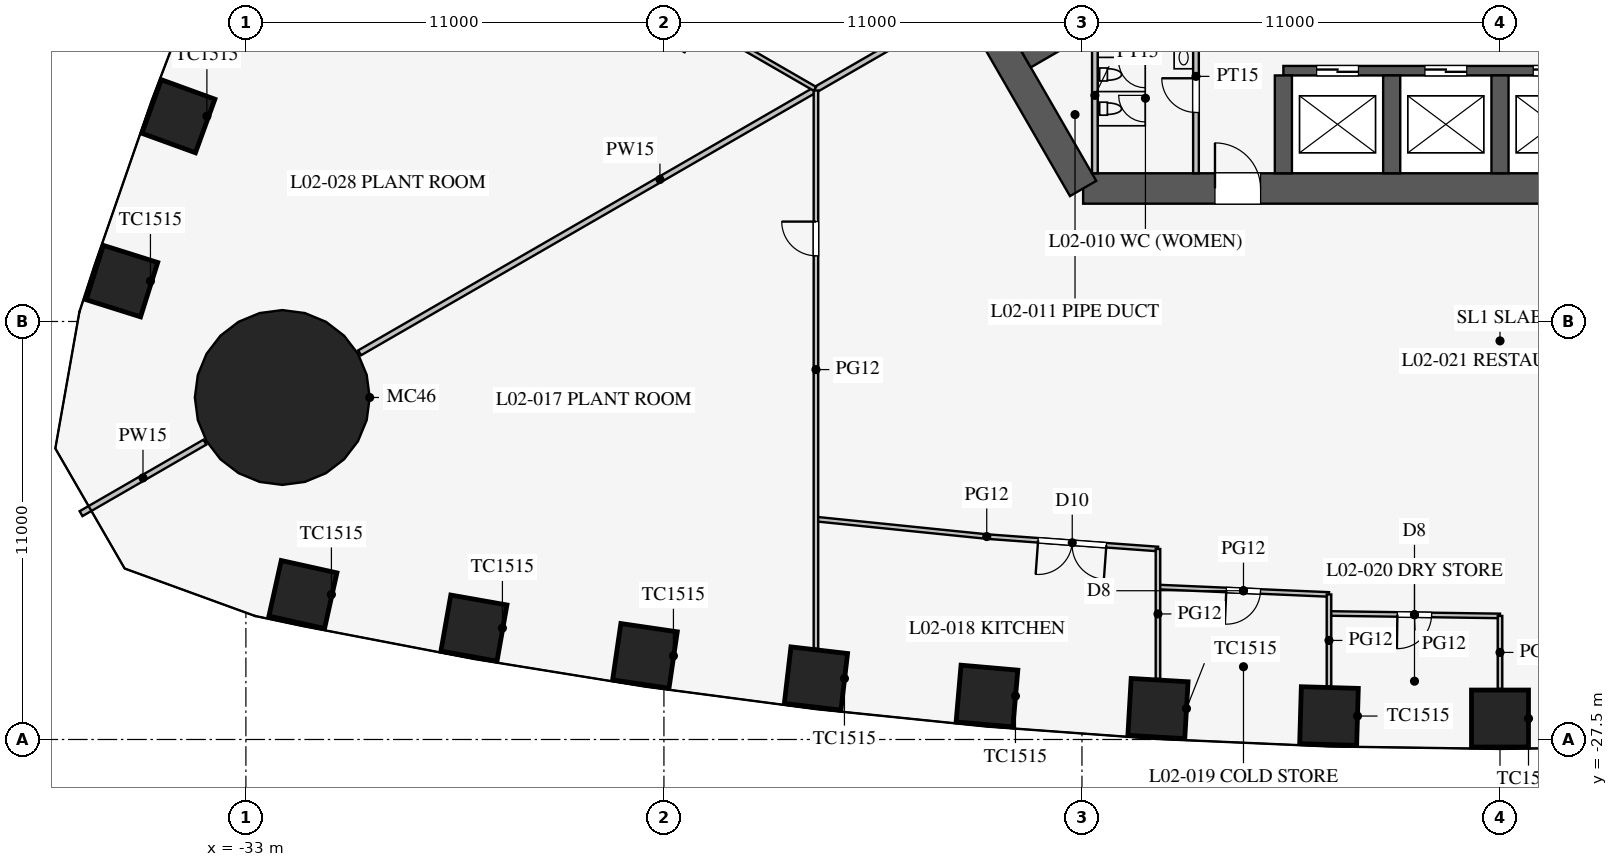
"""IFC4 building model, lengths in metres.
Left out: names, types, materials, properties, quantities, classifications, styles, units other than length and angle.
Written with IfcOpenShell. Run it as: python <this file> out.ifc"""

import sys

from ifc_helpers import new_model, si_unit, direction, frame, frame_2d, origin, origin_2d, place, context, subcontext, project, spatial, rectangle, circle, extrude, element, fill, save


model = new_model("IFC4")
c1 = context("Model", 3, precision=1e-05, world=origin(), true_north=direction((0.0, 1.0)))
c2 = subcontext(c1, "Body", "Model", "MODEL_VIEW")
j1 = project(units=[si_unit("LENGTHUNIT", "METRE"), si_unit("PLANEANGLEUNIT", "RADIAN")], contexts=[c1])
p1 = place(None, origin())
s1 = spatial("IfcSite", under=j1, at=p1, CompositionType="ELEMENT")
p2 = place(p1, origin())
s2 = spatial("IfcBuilding", under=s1, at=p2, CompositionType="ELEMENT")
p3 = place(p2, frame((0.0, 0.0, 11.5)))
s3 = spatial("IfcBuildingStorey", under=s2, at=p3, CompositionType="ELEMENT", Elevation=11.5)
for number, where, z_axis, x_axis in (
    (1, (-31.5, -23.685, 0.0), (0.0, 0.0, 1.0), (0.976, -0.217, 0.0)),
    (2, (-27.0, -24.568, 0.0), (0.0, 0.0, 1.0), (0.985, -0.174, 0.0)),
    (3, (-22.5, -25.299, 0.0), (0.0, 0.0, 1.0), (0.989, -0.145, 0.0)),
    (4, (-18.0, -25.895, 0.0), (0.0, 0.0, 1.0), (0.993, -0.116, 0.0)),
    (5, (-13.5, -26.357, 0.0), (0.0, 0.0, 1.0), (0.996, -0.087, 0.0)),
    (6, (-9.0, -26.686, 0.0), (0.0, 0.0, 1.0), (0.998, -0.058, 0.0)),
    (7, (-4.5, -26.883, 0.0), (0.0, 0.0, 1.0), (1.0, -0.029, 0.0)),
    (8, (0.0, -26.949, 0.0), (0.0, 0.0, 1.0), (1.0, 0.0, 0.0)),
    (9, (-34.776, -11.099, 0.0), (0.0, 0.0, 1.0), (-0.342, -0.94, 0.0)),
    (10, (-36.262, -15.438, 0.0), (0.0, 0.0, 1.0), (-0.3, -0.954, 0.0)),
):
    element("IfcColumn", number, at=place(p3, frame(where, z_axis=z_axis, x_axis=x_axis)), inside=s3, PredefinedType="COLUMN", context=c2, shape_type="SweptSolid", body=[
        extrude(rectangle(XDim=1.5, YDim=1.5, at=origin_2d()), origin(), (0.0, 0.0, 1.0), 5.0),
    ])
p4 = place(p3, frame((-32.043, -18.5, 0.0), z_axis=(0.0, 0.0, 1.0), x_axis=(1.0, 0.0, 0.0)))
e11 = element("IfcColumn", 11, at=p4, inside=s3, PredefinedType="COLUMN", context=c2, shape_type="SweptSolid", body=[
    extrude(circle(Radius=2.3, at=origin_2d()), origin(), (0.0, 0.0, 1.0), 5.0),
])
p5 = place(p3, frame((-10.97, -13.0, 0.0), z_axis=(0.0, 0.0, 1.0), x_axis=(1.0, 0.0, 0.0)))
e12 = element("IfcWall", 12, at=p5, inside=s3, PredefinedType="SHEAR", context=c2, shape_type="SweptSolid", body=[
    extrude(rectangle(XDim=21.939, YDim=0.8, at=frame_2d((10.97, 0.0))), origin(), (0.0, 0.0, 1.0), 5.0),
])
p6 = place(p5, frame((17.27, 0.0, 0.0)))
e13 = element("IfcOpeningElement", 13, at=p6, cuts=e12, PredefinedType="OPENING", context=c2, shape_type="SweptSolid", body=[
    extrude(rectangle(XDim=1.2, YDim=2.1, at=frame_2d((0.6, 1.05))), frame((0.0, 0.41, 0.0), z_axis=(0.0, -1.0, 0.0), x_axis=(1.0, 0.0, 0.0)), (0.0, 0.0, 1.0), 0.82),
])
p7 = place(p5, frame((3.47, 0.0, 0.0)))
e14 = element("IfcOpeningElement", 14, at=p7, cuts=e12, PredefinedType="OPENING", context=c2, shape_type="SweptSolid", body=[
    extrude(rectangle(XDim=1.2, YDim=2.1, at=frame_2d((0.6, 1.05))), frame((0.0, 0.41, 0.0), z_axis=(0.0, -1.0, 0.0), x_axis=(1.0, 0.0, 0.0)), (0.0, 0.0, 1.0), 0.82),
])
p8 = place(p3, frame((-16.743, -3.0, 0.0), z_axis=(0.0, 0.0, 1.0), x_axis=(0.499995765644, -0.866027848477, 0.0)))
e15 = element("IfcWall", 15, at=p8, inside=s3, PredefinedType="SHEAR", context=c2, shape_type="SweptSolid", body=[
    extrude(rectangle(XDim=11.547, YDim=0.8, at=frame_2d((5.773, 0.0))), origin(), (0.0, 0.0, 1.0), 5.0),
])
p9 = place(p3, frame((-5.7, -9.9, 0.0), z_axis=(0.0, 0.0, 1.0), x_axis=(1.0, 0.0, 0.0)))
e16 = element("IfcWall", 16, at=p9, inside=s3, PredefinedType="SHEAR", context=c2, shape_type="SweptSolid", body=[
    extrude(rectangle(XDim=11.4, YDim=0.25, at=frame_2d((5.7, 0.0))), origin(), (0.0, 0.0, 1.0), 5.0),
])
p10 = place(p9, frame((0.875, 0.0, 0.0)))
e17 = element("IfcOpeningElement", 17, at=p10, cuts=e16, PredefinedType="OPENING", context=c2, shape_type="SweptSolid", body=[
    extrude(rectangle(XDim=1.1, YDim=2.2, at=frame_2d((0.55, 1.1))), frame((0.0, 0.135, 0.0), z_axis=(0.0, -1.0, 0.0), x_axis=(1.0, 0.0, 0.0)), (0.0, 0.0, 1.0), 0.27),
])
p11 = place(p9, frame((3.725, 0.0, 0.0)))
e18 = element("IfcOpeningElement", 18, at=p11, cuts=e16, PredefinedType="OPENING", context=c2, shape_type="SweptSolid", body=[
    extrude(rectangle(XDim=1.1, YDim=2.2, at=frame_2d((0.55, 1.1))), frame((0.0, 0.135, 0.0), z_axis=(0.0, -1.0, 0.0), x_axis=(1.0, 0.0, 0.0)), (0.0, 0.0, 1.0), 0.27),
])
p12 = place(p9, frame((6.575, 0.0, 0.0)))
e19 = element("IfcOpeningElement", 19, at=p12, cuts=e16, PredefinedType="OPENING", context=c2, shape_type="SweptSolid", body=[
    extrude(rectangle(XDim=1.1, YDim=2.2, at=frame_2d((0.55, 1.1))), frame((0.0, 0.135, 0.0), z_axis=(0.0, -1.0, 0.0), x_axis=(1.0, 0.0, 0.0)), (0.0, 0.0, 1.0), 0.27),
])
p13 = place(p9, frame((9.425, 0.0, 0.0)))
e20 = element("IfcOpeningElement", 20, at=p13, cuts=e16, PredefinedType="OPENING", context=c2, shape_type="SweptSolid", body=[
    extrude(rectangle(XDim=1.1, YDim=2.2, at=frame_2d((0.55, 1.1))), frame((0.0, 0.135, 0.0), z_axis=(0.0, -1.0, 0.0), x_axis=(1.0, 0.0, 0.0)), (0.0, 0.0, 1.0), 0.27),
])
for number, where, z_axis, x_axis in (
    (21, (-5.7, -10.025, 0.0), (0.0, 0.0, 1.0), (0.0, -1.0, 0.0)),
    (22, (-2.85, -10.025, 0.0), (0.0, 0.0, 1.0), (0.0, -1.0, 0.0)),
    (23, (0.0, -10.025, 0.0), (0.0, 0.0, 1.0), (0.0, -1.0, 0.0)),
):
    element("IfcWall", number, at=place(p3, frame(where, z_axis=z_axis, x_axis=x_axis)), inside=s3, PredefinedType="SHEAR", context=c2, shape_type="SweptSolid", body=[
        extrude(rectangle(XDim=2.575, YDim=0.45, at=frame_2d((1.288, 0.0))), origin(), (0.0, 0.0, 1.0), 5.0),
    ])
p14 = place(p3, frame((-4.638, -5.016, 0.0), z_axis=(0.0, 0.0, 1.0), x_axis=(-0.866019375473, -0.500010441196, 0.0)))
e24 = element("IfcWall", 24, at=p14, inside=s3, PredefinedType="SHEAR", context=c2, shape_type="SweptSolid", body=[
    extrude(rectangle(XDim=9.075, YDim=0.6, at=frame_2d((4.538, 0.0))), origin(), (0.0, 0.0, 1.0), 5.0),
])
p15 = place(p3, frame((-8.0, -7.5, 0.0), z_axis=(0.0, 0.0, 1.0), x_axis=(0.0, -1.0, 0.0)))
e25 = element("IfcWall", 25, at=p15, inside=s3, PredefinedType="PARTITIONING", context=c2, shape_type="SweptSolid", body=[
    extrude(rectangle(XDim=5.1, YDim=0.15, at=frame_2d((2.55, 0.0))), origin(), (0.0, 0.0, 1.0), 4.8),
])
p16 = place(p15, frame((2.6, 0.0, 0.0)))
e26 = element("IfcOpeningElement", 26, at=p16, cuts=e25, PredefinedType="OPENING", context=c2, shape_type="SweptSolid", body=[
    extrude(rectangle(XDim=0.9, YDim=2.1, at=frame_2d((0.45, 1.05))), frame((0.0, 0.085, 0.0), z_axis=(0.0, -1.0, 0.0), x_axis=(1.0, 0.0, 0.0)), (0.0, 0.0, 1.0), 0.17),
])
p17 = place(p3, frame((-10.66, -8.5, 0.0), z_axis=(0.0, 0.0, 1.0), x_axis=(0.0, -1.0, 0.0)))
e27 = element("IfcWall", 27, at=p17, inside=s3, PredefinedType="PARTITIONING", context=c2, shape_type="SweptSolid", body=[
    extrude(rectangle(XDim=4.1, YDim=0.15, at=frame_2d((2.05, 0.0))), origin(), (0.0, 0.0, 1.0), 4.8),
])
p18 = place(p3, frame((-14.203, -8.2, 0.0), z_axis=(0.0, 0.0, 1.0), x_axis=(-0.866024965723, -0.500000758745, 0.0)))
e28 = element("IfcWall", 28, at=p18, inside=s3, PredefinedType="PARTITIONING", context=c2, shape_type="SweptSolid", body=[
    extrude(rectangle(XDim=18.25, YDim=0.15, at=frame_2d((9.125, 0.0))), origin(), (0.0, 0.0, 1.0), 3.1),
])
p19 = place(p3, frame((-34.078, -19.675, 0.0), z_axis=(0.0, 0.0, 1.0), x_axis=(-0.866019247219, -0.500010663332, 0.0)))
e29 = element("IfcWall", 29, at=p19, inside=s3, PredefinedType="PARTITIONING", context=c2, shape_type="SweptSolid", body=[
    extrude(rectangle(XDim=3.764, YDim=0.15, at=frame_2d((1.882, 0.0))), origin(), (0.0, 0.0, 1.0), 3.1),
])
p20 = place(p3, frame((-13.5, -22.16, 0.0), z_axis=(0.0, 0.0, 1.0), x_axis=(0.997363894896, -0.072562119306, 0.0)))
e30 = element("IfcWall", 30, at=p20, inside=s3, PredefinedType="PARTITIONING", context=c2, shape_type="SweptSolid", body=[
    extrude(rectangle(XDim=4.512, YDim=0.12, at=frame_2d((2.256, 0.0))), origin(), (0.0, 0.0, 1.0), 3.6),
])
p21 = place(p20, frame((1.35, 0.0, 0.0)))
e31 = element("IfcOpeningElement", 31, at=p21, cuts=e30, PredefinedType="OPENING", context=c2, shape_type="SweptSolid", body=[
    extrude(rectangle(XDim=1.8, YDim=2.1, at=frame_2d((0.9, 1.05))), frame((0.0, 0.07, 0.0), z_axis=(0.0, -1.0, 0.0), x_axis=(1.0, 0.0, 0.0)), (0.0, 0.0, 1.0), 0.14),
])
p22 = place(p3, frame((-18.0, -21.701, 0.0), z_axis=(0.0, 0.0, 1.0), x_axis=(0.994833141332, -0.101523499286, 0.0)))
e32 = element("IfcWall", 32, at=p22, inside=s3, PredefinedType="PARTITIONING", context=c2, shape_type="SweptSolid", body=[
    extrude(rectangle(XDim=4.523, YDim=0.12, at=frame_2d((2.262, 0.0))), origin(), (0.0, 0.0, 1.0), 3.6),
])
p23 = place(p3, frame((-4.5, -24.183, 0.0), z_axis=(0.0, 0.0, 1.0), x_axis=(0.999894311967, -0.014538393859, 0.0)))
e33 = element("IfcWall", 33, at=p23, inside=s3, PredefinedType="PARTITIONING", context=c2, shape_type="SweptSolid", body=[
    extrude(rectangle(XDim=4.5, YDim=0.12, at=frame_2d((2.25, 0.0))), origin(), (0.0, 0.0, 1.0), 3.6),
])
p24 = place(p23, frame((1.8, 0.0, 0.0)))
e34 = element("IfcOpeningElement", 34, at=p24, cuts=e33, PredefinedType="OPENING", context=c2, shape_type="SweptSolid", body=[
    extrude(rectangle(XDim=0.9, YDim=2.1, at=frame_2d((0.45, 1.05))), frame((0.0, 0.07, 0.0), z_axis=(0.0, -1.0, 0.0), x_axis=(1.0, 0.0, 0.0)), (0.0, 0.0, 1.0), 0.14),
])
p25 = place(p3, frame((-9.0, -23.487, 0.0), z_axis=(0.0, 0.0, 1.0), x_axis=(0.999052370647, -0.043524254212, 0.0)))
e35 = element("IfcWall", 35, at=p25, inside=s3, PredefinedType="PARTITIONING", context=c2, shape_type="SweptSolid", body=[
    extrude(rectangle(XDim=4.504, YDim=0.12, at=frame_2d((2.252, 0.0))), origin(), (0.0, 0.0, 1.0), 3.6),
])
p26 = place(p25, frame((1.8, 0.0, 0.0)))
e36 = element("IfcOpeningElement", 36, at=p26, cuts=e35, PredefinedType="OPENING", context=c2, shape_type="SweptSolid", body=[
    extrude(rectangle(XDim=0.9, YDim=2.1, at=frame_2d((0.45, 1.05))), frame((0.0, 0.07, 0.0), z_axis=(0.0, -1.0, 0.0), x_axis=(1.0, 0.0, 0.0)), (0.0, 0.0, 1.0), 0.14),
])
p27 = place(p3, frame((0.0, -24.249, 0.0), z_axis=(0.0, 0.0, 1.0), x_axis=(0.0, -1.0, 0.0)))
e37 = element("IfcWall", 37, at=p27, inside=s3, PredefinedType="PARTITIONING", context=c2, shape_type="SweptSolid", body=[
    extrude(rectangle(XDim=1.92, YDim=0.12, at=frame_2d((0.96, 0.0))), origin(), (0.0, 0.0, 1.0), 3.6),
])
p28 = place(p3, frame((-18.0, -10.421, 0.0), z_axis=(0.0, 0.0, 1.0), x_axis=(0.0, -1.0, 0.0)))
e38 = element("IfcWall", 38, at=p28, inside=s3, PredefinedType="PARTITIONING", context=c2, shape_type="SweptSolid", body=[
    extrude(rectangle(XDim=14.688, YDim=0.12, at=frame_2d((7.344, 0.0))), origin(), (0.0, 0.0, 1.0), 3.6),
])
p29 = place(p28, frame((3.45, 0.0, 0.0)))
e39 = element("IfcOpeningElement", 39, at=p29, cuts=e38, PredefinedType="OPENING", context=c2, shape_type="SweptSolid", body=[
    extrude(rectangle(XDim=0.9, YDim=2.1, at=frame_2d((0.45, 1.05))), frame((0.0, 0.07, 0.0), z_axis=(0.0, -1.0, 0.0), x_axis=(1.0, 0.0, 0.0)), (0.0, 0.0, 1.0), 0.14),
])
p30 = place(p3, frame((-4.5, -23.683, 0.0), z_axis=(0.0, 0.0, 1.0), x_axis=(0.0, -1.0, 0.0)))
e40 = element("IfcWall", 40, at=p30, inside=s3, PredefinedType="PARTITIONING", context=c2, shape_type="SweptSolid", body=[
    extrude(rectangle(XDim=2.419, YDim=0.12, at=frame_2d((1.21, 0.0))), origin(), (0.0, 0.0, 1.0), 3.6),
])
p31 = place(p3, frame((-9.0, -22.487, 0.0), z_axis=(0.0, 0.0, 1.0), x_axis=(0.0, -1.0, 0.0)))
e41 = element("IfcWall", 41, at=p31, inside=s3, PredefinedType="PARTITIONING", context=c2, shape_type="SweptSolid", body=[
    extrude(rectangle(XDim=3.417, YDim=0.12, at=frame_2d((1.709, 0.0))), origin(), (0.0, 0.0, 1.0), 3.6),
])
p32 = place(p3, frame((-18.025, -10.378, 0.0), z_axis=(0.0, 0.0, 1.0), x_axis=(-0.866027263711, 0.4999967785, 0.0)))
e42 = element("IfcWall", 42, at=p32, inside=s3, PredefinedType="PARTITIONING", context=c2, shape_type="SweptSolid", body=[
    extrude(rectangle(XDim=14.688, YDim=0.12, at=frame_2d((7.344, 0.0))), origin(), (0.0, 0.0, 1.0), 3.6),
])
p33 = place(p32, frame((3.45, 0.0, 0.0)))
e43 = element("IfcOpeningElement", 43, at=p33, cuts=e42, PredefinedType="OPENING", context=c2, shape_type="SweptSolid", body=[
    extrude(rectangle(XDim=0.9, YDim=2.1, at=frame_2d((0.45, 1.05))), frame((0.0, 0.07, 0.0), z_axis=(0.0, -1.0, 0.0), x_axis=(1.0, 0.0, 0.0)), (0.0, 0.0, 1.0), 0.14),
])
p34 = place(p16, frame((0.9, 0.0, 0.0), z_axis=(0.0, 0.0, 1.0), x_axis=(-1.0, 0.0, 0.0)))
e44 = element("IfcDoor", 44, at=p34, inside=s3, OperationType="SINGLE_SWING_RIGHT", PredefinedType="DOOR", context=c2, shape_type="SweptSolid", body=[
    extrude(rectangle(XDim=0.9, YDim=2.1, at=frame_2d((0.45, 1.05))), frame((0.0, 0.025, 0.0), z_axis=(0.0, -1.0, 0.0), x_axis=(1.0, 0.0, 0.0)), (0.0, 0.0, 1.0), 0.05),
])
fill(e26, e44)
p35 = place(p7, origin())
e45 = element("IfcDoor", 45, at=p35, inside=s3, OperationType="SINGLE_SWING_LEFT", PredefinedType="DOOR", context=c2, shape_type="SweptSolid", body=[
    extrude(rectangle(XDim=1.2, YDim=2.1, at=frame_2d((0.6, 1.05))), frame((0.0, 0.025, 0.0), z_axis=(0.0, -1.0, 0.0), x_axis=(1.0, 0.0, 0.0)), (0.0, 0.0, 1.0), 0.05),
])
fill(e14, e45)
p36 = place(p29, frame((0.9, 0.0, 0.0), z_axis=(0.0, 0.0, 1.0), x_axis=(-1.0, 0.0, 0.0)))
e46 = element("IfcDoor", 46, at=p36, inside=s3, OperationType="SINGLE_SWING_RIGHT", PredefinedType="DOOR", context=c2, shape_type="SweptSolid", body=[
    extrude(rectangle(XDim=0.9, YDim=2.1, at=frame_2d((0.45, 1.05))), frame((0.0, 0.025, 0.0), z_axis=(0.0, -1.0, 0.0), x_axis=(1.0, 0.0, 0.0)), (0.0, 0.0, 1.0), 0.05),
])
fill(e39, e46)
p37 = place(p21, frame((1.8, 0.0, 0.0), z_axis=(0.0, 0.0, 1.0), x_axis=(-1.0, 0.0, 0.0)))
e47 = element("IfcDoor", 47, at=p37, inside=s3, OperationType="DOUBLE_DOOR_SINGLE_SWING", PredefinedType="DOOR", context=c2, shape_type="SweptSolid", body=[
    extrude(rectangle(XDim=1.8, YDim=2.1, at=frame_2d((0.9, 1.05))), frame((0.0, 0.025, 0.0), z_axis=(0.0, -1.0, 0.0), x_axis=(1.0, 0.0, 0.0)), (0.0, 0.0, 1.0), 0.05),
])
fill(e31, e47)
p38 = place(p26, frame((0.9, 0.0, 0.0), z_axis=(0.0, 0.0, 1.0), x_axis=(-1.0, 0.0, 0.0)))
e48 = element("IfcDoor", 48, at=p38, inside=s3, OperationType="SINGLE_SWING_RIGHT", PredefinedType="DOOR", context=c2, shape_type="SweptSolid", body=[
    extrude(rectangle(XDim=0.9, YDim=2.1, at=frame_2d((0.45, 1.05))), frame((0.0, 0.025, 0.0), z_axis=(0.0, -1.0, 0.0), x_axis=(1.0, 0.0, 0.0)), (0.0, 0.0, 1.0), 0.05),
])
fill(e36, e48)
p39 = place(p24, frame((0.9, 0.0, 0.0), z_axis=(0.0, 0.0, 1.0), x_axis=(-1.0, 0.0, 0.0)))
e49 = element("IfcDoor", 49, at=p39, inside=s3, OperationType="SINGLE_SWING_RIGHT", PredefinedType="DOOR", context=c2, shape_type="SweptSolid", body=[
    extrude(rectangle(XDim=0.9, YDim=2.1, at=frame_2d((0.45, 1.05))), frame((0.0, 0.025, 0.0), z_axis=(0.0, -1.0, 0.0), x_axis=(1.0, 0.0, 0.0)), (0.0, 0.0, 1.0), 0.05),
])
fill(e34, e49)
p40 = place(p10, origin())
e50 = element("IfcDoor", 50, at=p40, inside=s3, OperationType="DOUBLE_DOOR_SLIDING", PredefinedType="DOOR", context=c2, shape_type="SweptSolid", body=[
    extrude(rectangle(XDim=1.1, YDim=2.2, at=frame_2d((0.55, 1.1))), frame((0.0, 0.025, 0.0), z_axis=(0.0, -1.0, 0.0), x_axis=(1.0, 0.0, 0.0)), (0.0, 0.0, 1.0), 0.05),
])
fill(e17, e50)
p41 = place(p11, origin())
e51 = element("IfcDoor", 51, at=p41, inside=s3, OperationType="DOUBLE_DOOR_SLIDING", PredefinedType="DOOR", context=c2, shape_type="SweptSolid", body=[
    extrude(rectangle(XDim=1.1, YDim=2.2, at=frame_2d((0.55, 1.1))), frame((0.0, 0.025, 0.0), z_axis=(0.0, -1.0, 0.0), x_axis=(1.0, 0.0, 0.0)), (0.0, 0.0, 1.0), 0.05),
])
fill(e18, e51)
p42 = place(p12, origin())
e52 = element("IfcDoor", 52, at=p42, inside=s3, OperationType="DOUBLE_DOOR_SLIDING", PredefinedType="DOOR", context=c2, shape_type="SweptSolid", body=[
    extrude(rectangle(XDim=1.1, YDim=2.2, at=frame_2d((0.55, 1.1))), frame((0.0, 0.025, 0.0), z_axis=(0.0, -1.0, 0.0), x_axis=(1.0, 0.0, 0.0)), (0.0, 0.0, 1.0), 0.05),
])
fill(e19, e52)
save(model, sys.argv[1])
